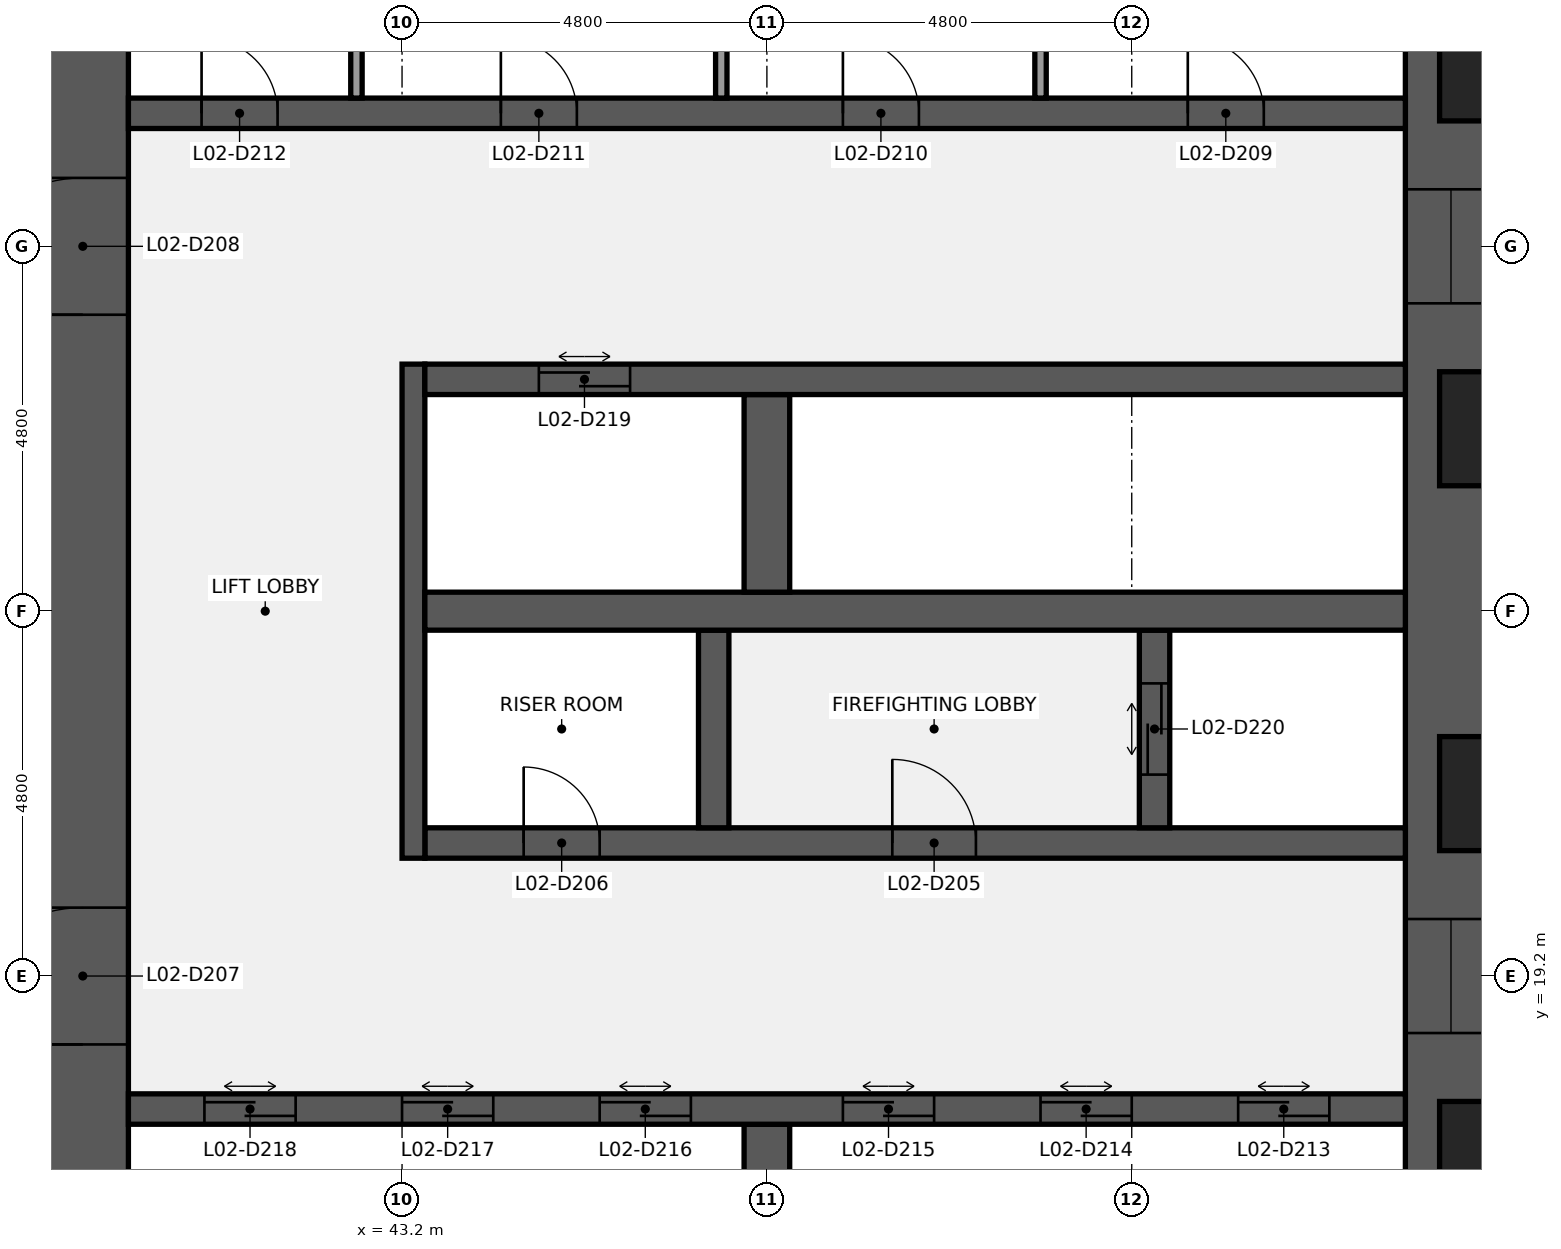
"""IFC4 building model, lengths in metres.
Left out: names, types, materials, properties, quantities, classifications, styles, units other than length and angle.
Written with IfcOpenShell. Run it as: python <this file> out.ifc"""

import sys

from ifc_helpers import new_model, si_unit, direction, frame, frame_2d, origin, place, context, subcontext, project, spatial, rectangle, extrude, element, fill, save


model = new_model("IFC4")
c1 = context("Model", 3, precision=1e-05, world=origin(), true_north=direction((0.0, 1.0)))
c2 = subcontext(c1, "Body", "Model", "MODEL_VIEW")
j1 = project(units=[si_unit("LENGTHUNIT", "METRE"), si_unit("PLANEANGLEUNIT", "RADIAN")], contexts=[c1])
p1 = place(None, origin())
s1 = spatial("IfcSite", under=j1, at=p1, CompositionType="ELEMENT")
p2 = place(p1, origin())
s2 = spatial("IfcBuilding", under=s1, at=p2, CompositionType="ELEMENT")
p3 = place(p2, frame((0.0, 0.0, 17.0)))
s3 = spatial("IfcBuildingStorey", under=s2, at=p3, CompositionType="ELEMENT", Elevation=17.0)
p4 = place(p3, frame((57.0, 38.4, 0.0), z_axis=(0.0, 0.0, 1.0), x_axis=(0.0, -1.0, 0.0)))
e1 = element("IfcWall", 1, at=p4, inside=s3, PredefinedType="SHEAR", context=c2, shape_type="SweptSolid", body=[
    extrude(rectangle(XDim=28.8, YDim=1.2, at=frame_2d((14.4, 0.0))), origin(), (0.0, 0.0, 1.0), 4.24),
])
p5 = place(p4, frame((18.45, 0.0, 0.9)))
e2 = element("IfcOpeningElement", 2, at=p5, cuts=e1, PredefinedType="OPENING", context=c2, shape_type="SweptSolid", body=[
    extrude(rectangle(XDim=1.5, YDim=1.5, at=frame_2d((0.75, 0.75))), frame((0.0, 0.61, 0.0), z_axis=(0.0, -1.0, 0.0), x_axis=(1.0, 0.0, 0.0)), (0.0, 0.0, 1.0), 1.22),
])
p6 = place(p4, frame((8.85, 0.0, 0.9)))
e3 = element("IfcOpeningElement", 3, at=p6, cuts=e1, PredefinedType="OPENING", context=c2, shape_type="SweptSolid", body=[
    extrude(rectangle(XDim=1.5, YDim=1.5, at=frame_2d((0.75, 0.75))), frame((0.0, 0.61, 0.0), z_axis=(0.0, -1.0, 0.0), x_axis=(1.0, 0.0, 0.0)), (0.0, 0.0, 1.0), 1.22),
])
p7 = place(p3, frame((39.0, 9.6, 0.0), z_axis=(0.0, 0.0, 1.0), x_axis=(0.0, 1.0, 0.0)))
e4 = element("IfcWall", 4, at=p7, inside=s3, PredefinedType="SHEAR", context=c2, shape_type="SweptSolid", body=[
    extrude(rectangle(XDim=28.8, YDim=1.2, at=frame_2d((14.4, 0.0))), origin(), (0.0, 0.0, 1.0), 4.24),
])
p8 = place(p7, frame((8.7, 0.0, 0.0)))
e5 = element("IfcOpeningElement", 5, at=p8, cuts=e4, PredefinedType="OPENING", context=c2, shape_type="SweptSolid", body=[
    extrude(rectangle(XDim=1.8, YDim=2.1, at=frame_2d((0.9, 1.05))), frame((0.0, 0.61, 0.0), z_axis=(0.0, -1.0, 0.0), x_axis=(1.0, 0.0, 0.0)), (0.0, 0.0, 1.0), 1.22),
])
p9 = place(p7, frame((18.3, 0.0, 0.0)))
e6 = element("IfcOpeningElement", 6, at=p9, cuts=e4, PredefinedType="OPENING", context=c2, shape_type="SweptSolid", body=[
    extrude(rectangle(XDim=1.8, YDim=2.1, at=frame_2d((0.9, 1.05))), frame((0.0, 0.61, 0.0), z_axis=(0.0, -1.0, 0.0), x_axis=(1.0, 0.0, 0.0)), (0.0, 0.0, 1.0), 1.22),
])
p10 = place(p3, frame((48.0, 14.65, 0.0), z_axis=(0.0, 0.0, 1.0), x_axis=(0.0, 1.0, 0.0)))
e7 = element("IfcWall", 7, at=p10, inside=s3, PredefinedType="SHEAR", context=c2, shape_type="SweptSolid", body=[
    extrude(rectangle(XDim=2.6, YDim=0.6, at=frame_2d((1.3, 0.0))), origin(), (0.0, 0.0, 1.0), 4.24),
])
p11 = place(p3, frame((39.6, 17.45, 0.0), z_axis=(0.0, 0.0, 1.0), x_axis=(1.0, 0.0, 0.0)))
e8 = element("IfcWall", 8, at=p11, inside=s3, PredefinedType="SHEAR", context=c2, shape_type="SweptSolid", body=[
    extrude(rectangle(XDim=16.8, YDim=0.4, at=frame_2d((8.4, 0.0))), origin(), (0.0, 0.0, 1.0), 4.24),
])
p12 = place(p11, frame((14.6, 0.0, 0.0)))
e9 = element("IfcOpeningElement", 9, at=p12, cuts=e8, PredefinedType="OPENING", context=c2, shape_type="SweptSolid", body=[
    extrude(rectangle(XDim=1.2, YDim=2.1, at=frame_2d((0.6, 1.05))), frame((0.0, 0.21, 0.0), z_axis=(0.0, -1.0, 0.0), x_axis=(1.0, 0.0, 0.0)), (0.0, 0.0, 1.0), 0.42),
])
p13 = place(p11, frame((12.0, 0.0, 0.0)))
e10 = element("IfcOpeningElement", 10, at=p13, cuts=e8, PredefinedType="OPENING", context=c2, shape_type="SweptSolid", body=[
    extrude(rectangle(XDim=1.2, YDim=2.1, at=frame_2d((0.6, 1.05))), frame((0.0, 0.21, 0.0), z_axis=(0.0, -1.0, 0.0), x_axis=(1.0, 0.0, 0.0)), (0.0, 0.0, 1.0), 0.42),
])
p14 = place(p11, frame((9.4, 0.0, 0.0)))
e11 = element("IfcOpeningElement", 11, at=p14, cuts=e8, PredefinedType="OPENING", context=c2, shape_type="SweptSolid", body=[
    extrude(rectangle(XDim=1.2, YDim=2.1, at=frame_2d((0.6, 1.05))), frame((0.0, 0.21, 0.0), z_axis=(0.0, -1.0, 0.0), x_axis=(1.0, 0.0, 0.0)), (0.0, 0.0, 1.0), 0.42),
])
p15 = place(p11, frame((6.2, 0.0, 0.0)))
e12 = element("IfcOpeningElement", 12, at=p15, cuts=e8, PredefinedType="OPENING", context=c2, shape_type="SweptSolid", body=[
    extrude(rectangle(XDim=1.2, YDim=2.1, at=frame_2d((0.6, 1.05))), frame((0.0, 0.21, 0.0), z_axis=(0.0, -1.0, 0.0), x_axis=(1.0, 0.0, 0.0)), (0.0, 0.0, 1.0), 0.42),
])
p16 = place(p11, frame((3.6, 0.0, 0.0)))
e13 = element("IfcOpeningElement", 13, at=p16, cuts=e8, PredefinedType="OPENING", context=c2, shape_type="SweptSolid", body=[
    extrude(rectangle(XDim=1.2, YDim=2.1, at=frame_2d((0.6, 1.05))), frame((0.0, 0.21, 0.0), z_axis=(0.0, -1.0, 0.0), x_axis=(1.0, 0.0, 0.0)), (0.0, 0.0, 1.0), 0.42),
])
p17 = place(p11, frame((1.0, 0.0, 0.0)))
e14 = element("IfcOpeningElement", 14, at=p17, cuts=e8, PredefinedType="OPENING", context=c2, shape_type="SweptSolid", body=[
    extrude(rectangle(XDim=1.2, YDim=2.1, at=frame_2d((0.6, 1.05))), frame((0.0, 0.21, 0.0), z_axis=(0.0, -1.0, 0.0), x_axis=(1.0, 0.0, 0.0)), (0.0, 0.0, 1.0), 0.42),
])
p18 = place(p3, frame((43.5, 20.95, 0.0), z_axis=(0.0, 0.0, 1.0), x_axis=(1.0, 0.0, 0.0)))
e15 = element("IfcWall", 15, at=p18, inside=s3, PredefinedType="SHEAR", context=c2, shape_type="SweptSolid", body=[
    extrude(rectangle(XDim=12.9, YDim=0.4, at=frame_2d((6.45, 0.0))), origin(), (0.0, 0.0, 1.0), 4.24),
])
p19 = place(p18, frame((6.15, 0.0, 0.0)))
e16 = element("IfcOpeningElement", 16, at=p19, cuts=e15, PredefinedType="OPENING", context=c2, shape_type="SweptSolid", body=[
    extrude(rectangle(XDim=1.1, YDim=2.1, at=frame_2d((0.55, 1.05))), frame((0.0, 0.21, 0.0), z_axis=(0.0, -1.0, 0.0), x_axis=(1.0, 0.0, 0.0)), (0.0, 0.0, 1.0), 0.42),
])
p20 = place(p18, frame((1.3, 0.0, 0.0)))
e17 = element("IfcOpeningElement", 17, at=p20, cuts=e15, PredefinedType="OPENING", context=c2, shape_type="SweptSolid", body=[
    extrude(rectangle(XDim=1.0, YDim=2.1, at=frame_2d((0.5, 1.05))), frame((0.0, 0.21, 0.0), z_axis=(0.0, -1.0, 0.0), x_axis=(1.0, 0.0, 0.0)), (0.0, 0.0, 1.0), 0.42),
])
p21 = place(p3, frame((43.35, 20.75, 0.0), z_axis=(0.0, 0.0, 1.0), x_axis=(0.0, 1.0, 0.0)))
e18 = element("IfcWall", 18, at=p21, inside=s3, PredefinedType="SHEAR", context=c2, shape_type="SweptSolid", body=[
    extrude(rectangle(XDim=6.5, YDim=0.3, at=frame_2d((3.25, 0.0))), origin(), (0.0, 0.0, 1.0), 4.24),
])
p22 = place(p3, frame((53.1, 21.15, 0.0), z_axis=(0.0, 0.0, 1.0), x_axis=(0.0, 1.0, 0.0)))
e19 = element("IfcWall", 19, at=p22, inside=s3, PredefinedType="SHEAR", context=c2, shape_type="SweptSolid", body=[
    extrude(rectangle(XDim=2.6, YDim=0.4, at=frame_2d((1.3, 0.0))), origin(), (0.0, 0.0, 1.0), 4.24),
])
p23 = place(p22, frame((0.7, 0.0, 0.0)))
e20 = element("IfcOpeningElement", 20, at=p23, cuts=e19, PredefinedType="OPENING", context=c2, shape_type="SweptSolid", body=[
    extrude(rectangle(XDim=1.2, YDim=2.1, at=frame_2d((0.6, 1.05))), frame((0.0, 0.21, 0.0), z_axis=(0.0, -1.0, 0.0), x_axis=(1.0, 0.0, 0.0)), (0.0, 0.0, 1.0), 0.42),
])
p24 = place(p3, frame((47.3, 21.15, 0.0), z_axis=(0.0, 0.0, 1.0), x_axis=(0.0, 1.0, 0.0)))
e21 = element("IfcWall", 21, at=p24, inside=s3, PredefinedType="SHEAR", context=c2, shape_type="SweptSolid", body=[
    extrude(rectangle(XDim=2.6, YDim=0.4, at=frame_2d((1.3, 0.0))), origin(), (0.0, 0.0, 1.0), 4.24),
])
p25 = place(p3, frame((43.5, 24.0, 0.0), z_axis=(0.0, 0.0, 1.0), x_axis=(1.0, 0.0, 0.0)))
e22 = element("IfcWall", 22, at=p25, inside=s3, PredefinedType="SHEAR", context=c2, shape_type="SweptSolid", body=[
    extrude(rectangle(XDim=12.9, YDim=0.5, at=frame_2d((6.45, 0.0))), origin(), (0.0, 0.0, 1.0), 4.24),
])
p26 = place(p3, frame((48.0, 24.25, 0.0), z_axis=(0.0, 0.0, 1.0), x_axis=(0.0, 1.0, 0.0)))
e23 = element("IfcWall", 23, at=p26, inside=s3, PredefinedType="SHEAR", context=c2, shape_type="SweptSolid", body=[
    extrude(rectangle(XDim=2.6, YDim=0.6, at=frame_2d((1.3, 0.0))), origin(), (0.0, 0.0, 1.0), 4.24),
])
p27 = place(p3, frame((43.5, 27.05, 0.0), z_axis=(0.0, 0.0, 1.0), x_axis=(1.0, 0.0, 0.0)))
e24 = element("IfcWall", 24, at=p27, inside=s3, PredefinedType="SHEAR", context=c2, shape_type="SweptSolid", body=[
    extrude(rectangle(XDim=12.9, YDim=0.4, at=frame_2d((6.45, 0.0))), origin(), (0.0, 0.0, 1.0), 4.24),
])
p28 = place(p27, frame((1.5, 0.0, 0.0)))
e25 = element("IfcOpeningElement", 25, at=p28, cuts=e24, PredefinedType="OPENING", context=c2, shape_type="SweptSolid", body=[
    extrude(rectangle(XDim=1.2, YDim=2.1, at=frame_2d((0.6, 1.05))), frame((0.0, 0.21, 0.0), z_axis=(0.0, -1.0, 0.0), x_axis=(1.0, 0.0, 0.0)), (0.0, 0.0, 1.0), 0.42),
])
p29 = place(p3, frame((39.6, 30.55, 0.0), z_axis=(0.0, 0.0, 1.0), x_axis=(1.0, 0.0, 0.0)))
e26 = element("IfcWall", 26, at=p29, inside=s3, PredefinedType="SHEAR", context=c2, shape_type="SweptSolid", body=[
    extrude(rectangle(XDim=16.8, YDim=0.4, at=frame_2d((8.4, 0.0))), origin(), (0.0, 0.0, 1.0), 4.24),
])
p30 = place(p29, frame((13.938, 0.0, 0.0)))
e27 = element("IfcOpeningElement", 27, at=p30, cuts=e26, PredefinedType="OPENING", context=c2, shape_type="SweptSolid", body=[
    extrude(rectangle(XDim=1.0, YDim=2.1, at=frame_2d((0.5, 1.05))), frame((0.0, 0.21, 0.0), z_axis=(0.0, -1.0, 0.0), x_axis=(1.0, 0.0, 0.0)), (0.0, 0.0, 1.0), 0.42),
])
p31 = place(p29, frame((9.4, 0.0, 0.0)))
e28 = element("IfcOpeningElement", 28, at=p31, cuts=e26, PredefinedType="OPENING", context=c2, shape_type="SweptSolid", body=[
    extrude(rectangle(XDim=1.0, YDim=2.1, at=frame_2d((0.5, 1.05))), frame((0.0, 0.21, 0.0), z_axis=(0.0, -1.0, 0.0), x_axis=(1.0, 0.0, 0.0)), (0.0, 0.0, 1.0), 0.42),
])
p32 = place(p29, frame((4.9, 0.0, 0.0)))
e29 = element("IfcOpeningElement", 29, at=p32, cuts=e26, PredefinedType="OPENING", context=c2, shape_type="SweptSolid", body=[
    extrude(rectangle(XDim=1.0, YDim=2.1, at=frame_2d((0.5, 1.05))), frame((0.0, 0.21, 0.0), z_axis=(0.0, -1.0, 0.0), x_axis=(1.0, 0.0, 0.0)), (0.0, 0.0, 1.0), 0.42),
])
p33 = place(p29, frame((0.962, 0.0, 0.0)))
e30 = element("IfcOpeningElement", 30, at=p33, cuts=e26, PredefinedType="OPENING", context=c2, shape_type="SweptSolid", body=[
    extrude(rectangle(XDim=1.0, YDim=2.1, at=frame_2d((0.5, 1.05))), frame((0.0, 0.21, 0.0), z_axis=(0.0, -1.0, 0.0), x_axis=(1.0, 0.0, 0.0)), (0.0, 0.0, 1.0), 0.42),
])
for number, where, z_axis, x_axis in (
    (31, (51.6, 30.75, 0.0), (0.0, 0.0, 1.0), (0.0, 1.0, 0.0)),
    (32, (47.4, 30.75, 0.0), (0.0, 0.0, 1.0), (0.0, 1.0, 0.0)),
    (33, (42.6, 30.75, 0.0), (0.0, 0.0, 1.0), (0.0, 1.0, 0.0)),
):
    element("IfcWall", number, at=place(p3, frame(where, z_axis=z_axis, x_axis=x_axis)), inside=s3, PredefinedType="PARTITIONING", context=c2, shape_type="SweptSolid", body=[
        extrude(rectangle(XDim=2.6, YDim=0.15, at=frame_2d((1.3, 0.0))), origin(), (0.0, 0.0, 1.0), 4.24),
    ])
p34 = place(p19, origin())
e34 = element("IfcDoor", 34, at=p34, inside=s3, OperationType="SINGLE_SWING_LEFT", PredefinedType="DOOR", context=c2, shape_type="SweptSolid", body=[
    extrude(rectangle(XDim=1.1, YDim=2.1, at=frame_2d((0.55, 1.05))), frame((0.0, 0.025, 0.0), z_axis=(0.0, -1.0, 0.0), x_axis=(1.0, 0.0, 0.0)), (0.0, 0.0, 1.0), 0.05),
])
fill(e16, e34)
p35 = place(p20, origin())
e35 = element("IfcDoor", 35, at=p35, inside=s3, OperationType="SINGLE_SWING_LEFT", PredefinedType="DOOR", context=c2, shape_type="SweptSolid", body=[
    extrude(rectangle(XDim=1.0, YDim=2.1, at=frame_2d((0.5, 1.05))), frame((0.0, 0.025, 0.0), z_axis=(0.0, -1.0, 0.0), x_axis=(1.0, 0.0, 0.0)), (0.0, 0.0, 1.0), 0.05),
])
fill(e17, e35)
p36 = place(p8, origin())
e36 = element("IfcDoor", 36, at=p36, inside=s3, OperationType="DOUBLE_DOOR_SINGLE_SWING", PredefinedType="DOOR", context=c2, shape_type="SweptSolid", body=[
    extrude(rectangle(XDim=1.8, YDim=2.1, at=frame_2d((0.9, 1.05))), frame((0.0, 0.025, 0.0), z_axis=(0.0, -1.0, 0.0), x_axis=(1.0, 0.0, 0.0)), (0.0, 0.0, 1.0), 0.05),
])
fill(e5, e36)
p37 = place(p9, origin())
e37 = element("IfcDoor", 37, at=p37, inside=s3, OperationType="DOUBLE_DOOR_SINGLE_SWING", PredefinedType="DOOR", context=c2, shape_type="SweptSolid", body=[
    extrude(rectangle(XDim=1.8, YDim=2.1, at=frame_2d((0.9, 1.05))), frame((0.0, 0.025, 0.0), z_axis=(0.0, -1.0, 0.0), x_axis=(1.0, 0.0, 0.0)), (0.0, 0.0, 1.0), 0.05),
])
fill(e6, e37)
p38 = place(p30, origin())
e38 = element("IfcDoor", 38, at=p38, inside=s3, OperationType="SINGLE_SWING_LEFT", PredefinedType="DOOR", context=c2, shape_type="SweptSolid", body=[
    extrude(rectangle(XDim=1.0, YDim=2.1, at=frame_2d((0.5, 1.05))), frame((0.0, 0.025, 0.0), z_axis=(0.0, -1.0, 0.0), x_axis=(1.0, 0.0, 0.0)), (0.0, 0.0, 1.0), 0.05),
])
fill(e27, e38)
p39 = place(p31, origin())
e39 = element("IfcDoor", 39, at=p39, inside=s3, OperationType="SINGLE_SWING_LEFT", PredefinedType="DOOR", context=c2, shape_type="SweptSolid", body=[
    extrude(rectangle(XDim=1.0, YDim=2.1, at=frame_2d((0.5, 1.05))), frame((0.0, 0.025, 0.0), z_axis=(0.0, -1.0, 0.0), x_axis=(1.0, 0.0, 0.0)), (0.0, 0.0, 1.0), 0.05),
])
fill(e28, e39)
p40 = place(p32, origin())
e40 = element("IfcDoor", 40, at=p40, inside=s3, OperationType="SINGLE_SWING_LEFT", PredefinedType="DOOR", context=c2, shape_type="SweptSolid", body=[
    extrude(rectangle(XDim=1.0, YDim=2.1, at=frame_2d((0.5, 1.05))), frame((0.0, 0.025, 0.0), z_axis=(0.0, -1.0, 0.0), x_axis=(1.0, 0.0, 0.0)), (0.0, 0.0, 1.0), 0.05),
])
fill(e29, e40)
p41 = place(p33, origin())
e41 = element("IfcDoor", 41, at=p41, inside=s3, OperationType="SINGLE_SWING_LEFT", PredefinedType="DOOR", context=c2, shape_type="SweptSolid", body=[
    extrude(rectangle(XDim=1.0, YDim=2.1, at=frame_2d((0.5, 1.05))), frame((0.0, 0.025, 0.0), z_axis=(0.0, -1.0, 0.0), x_axis=(1.0, 0.0, 0.0)), (0.0, 0.0, 1.0), 0.05),
])
fill(e30, e41)
p42 = place(p12, origin())
e42 = element("IfcDoor", 42, at=p42, inside=s3, OperationType="DOUBLE_DOOR_SLIDING", PredefinedType="DOOR", context=c2, shape_type="SweptSolid", body=[
    extrude(rectangle(XDim=1.2, YDim=2.1, at=frame_2d((0.6, 1.05))), frame((0.0, 0.025, 0.0), z_axis=(0.0, -1.0, 0.0), x_axis=(1.0, 0.0, 0.0)), (0.0, 0.0, 1.0), 0.05),
])
fill(e9, e42)
p43 = place(p13, origin())
e43 = element("IfcDoor", 43, at=p43, inside=s3, OperationType="DOUBLE_DOOR_SLIDING", PredefinedType="DOOR", context=c2, shape_type="SweptSolid", body=[
    extrude(rectangle(XDim=1.2, YDim=2.1, at=frame_2d((0.6, 1.05))), frame((0.0, 0.025, 0.0), z_axis=(0.0, -1.0, 0.0), x_axis=(1.0, 0.0, 0.0)), (0.0, 0.0, 1.0), 0.05),
])
fill(e10, e43)
p44 = place(p14, origin())
e44 = element("IfcDoor", 44, at=p44, inside=s3, OperationType="DOUBLE_DOOR_SLIDING", PredefinedType="DOOR", context=c2, shape_type="SweptSolid", body=[
    extrude(rectangle(XDim=1.2, YDim=2.1, at=frame_2d((0.6, 1.05))), frame((0.0, 0.025, 0.0), z_axis=(0.0, -1.0, 0.0), x_axis=(1.0, 0.0, 0.0)), (0.0, 0.0, 1.0), 0.05),
])
fill(e11, e44)
p45 = place(p15, origin())
e45 = element("IfcDoor", 45, at=p45, inside=s3, OperationType="DOUBLE_DOOR_SLIDING", PredefinedType="DOOR", context=c2, shape_type="SweptSolid", body=[
    extrude(rectangle(XDim=1.2, YDim=2.1, at=frame_2d((0.6, 1.05))), frame((0.0, 0.025, 0.0), z_axis=(0.0, -1.0, 0.0), x_axis=(1.0, 0.0, 0.0)), (0.0, 0.0, 1.0), 0.05),
])
fill(e12, e45)
p46 = place(p16, origin())
e46 = element("IfcDoor", 46, at=p46, inside=s3, OperationType="DOUBLE_DOOR_SLIDING", PredefinedType="DOOR", context=c2, shape_type="SweptSolid", body=[
    extrude(rectangle(XDim=1.2, YDim=2.1, at=frame_2d((0.6, 1.05))), frame((0.0, 0.025, 0.0), z_axis=(0.0, -1.0, 0.0), x_axis=(1.0, 0.0, 0.0)), (0.0, 0.0, 1.0), 0.05),
])
fill(e13, e46)
p47 = place(p17, origin())
e47 = element("IfcDoor", 47, at=p47, inside=s3, OperationType="DOUBLE_DOOR_SLIDING", PredefinedType="DOOR", context=c2, shape_type="SweptSolid", body=[
    extrude(rectangle(XDim=1.2, YDim=2.1, at=frame_2d((0.6, 1.05))), frame((0.0, 0.025, 0.0), z_axis=(0.0, -1.0, 0.0), x_axis=(1.0, 0.0, 0.0)), (0.0, 0.0, 1.0), 0.05),
])
fill(e14, e47)
p48 = place(p28, origin())
e48 = element("IfcDoor", 48, at=p48, inside=s3, OperationType="DOUBLE_DOOR_SLIDING", PredefinedType="DOOR", context=c2, shape_type="SweptSolid", body=[
    extrude(rectangle(XDim=1.2, YDim=2.1, at=frame_2d((0.6, 1.05))), frame((0.0, 0.025, 0.0), z_axis=(0.0, -1.0, 0.0), x_axis=(1.0, 0.0, 0.0)), (0.0, 0.0, 1.0), 0.05),
])
fill(e25, e48)
p49 = place(p23, origin())
e49 = element("IfcDoor", 49, at=p49, inside=s3, OperationType="DOUBLE_DOOR_SLIDING", PredefinedType="DOOR", context=c2, shape_type="SweptSolid", body=[
    extrude(rectangle(XDim=1.2, YDim=2.1, at=frame_2d((0.6, 1.05))), frame((0.0, 0.025, 0.0), z_axis=(0.0, -1.0, 0.0), x_axis=(1.0, 0.0, 0.0)), (0.0, 0.0, 1.0), 0.05),
])
fill(e20, e49)
p50 = place(p5, origin())
e50 = element("IfcWindow", 50, at=p50, inside=s3, PartitioningType="SINGLE_PANEL", PredefinedType="WINDOW", context=c2, shape_type="SweptSolid", body=[
    extrude(rectangle(XDim=1.5, YDim=1.5, at=frame_2d((0.75, 0.75))), frame((0.0, 0.03, 0.0), z_axis=(0.0, -1.0, 0.0), x_axis=(1.0, 0.0, 0.0)), (0.0, 0.0, 1.0), 0.06),
])
fill(e2, e50)
p51 = place(p6, origin())
e51 = element("IfcWindow", 51, at=p51, inside=s3, PartitioningType="SINGLE_PANEL", PredefinedType="WINDOW", context=c2, shape_type="SweptSolid", body=[
    extrude(rectangle(XDim=1.5, YDim=1.5, at=frame_2d((0.75, 0.75))), frame((0.0, 0.03, 0.0), z_axis=(0.0, -1.0, 0.0), x_axis=(1.0, 0.0, 0.0)), (0.0, 0.0, 1.0), 0.06),
])
fill(e3, e51)
save(model, sys.argv[1])
